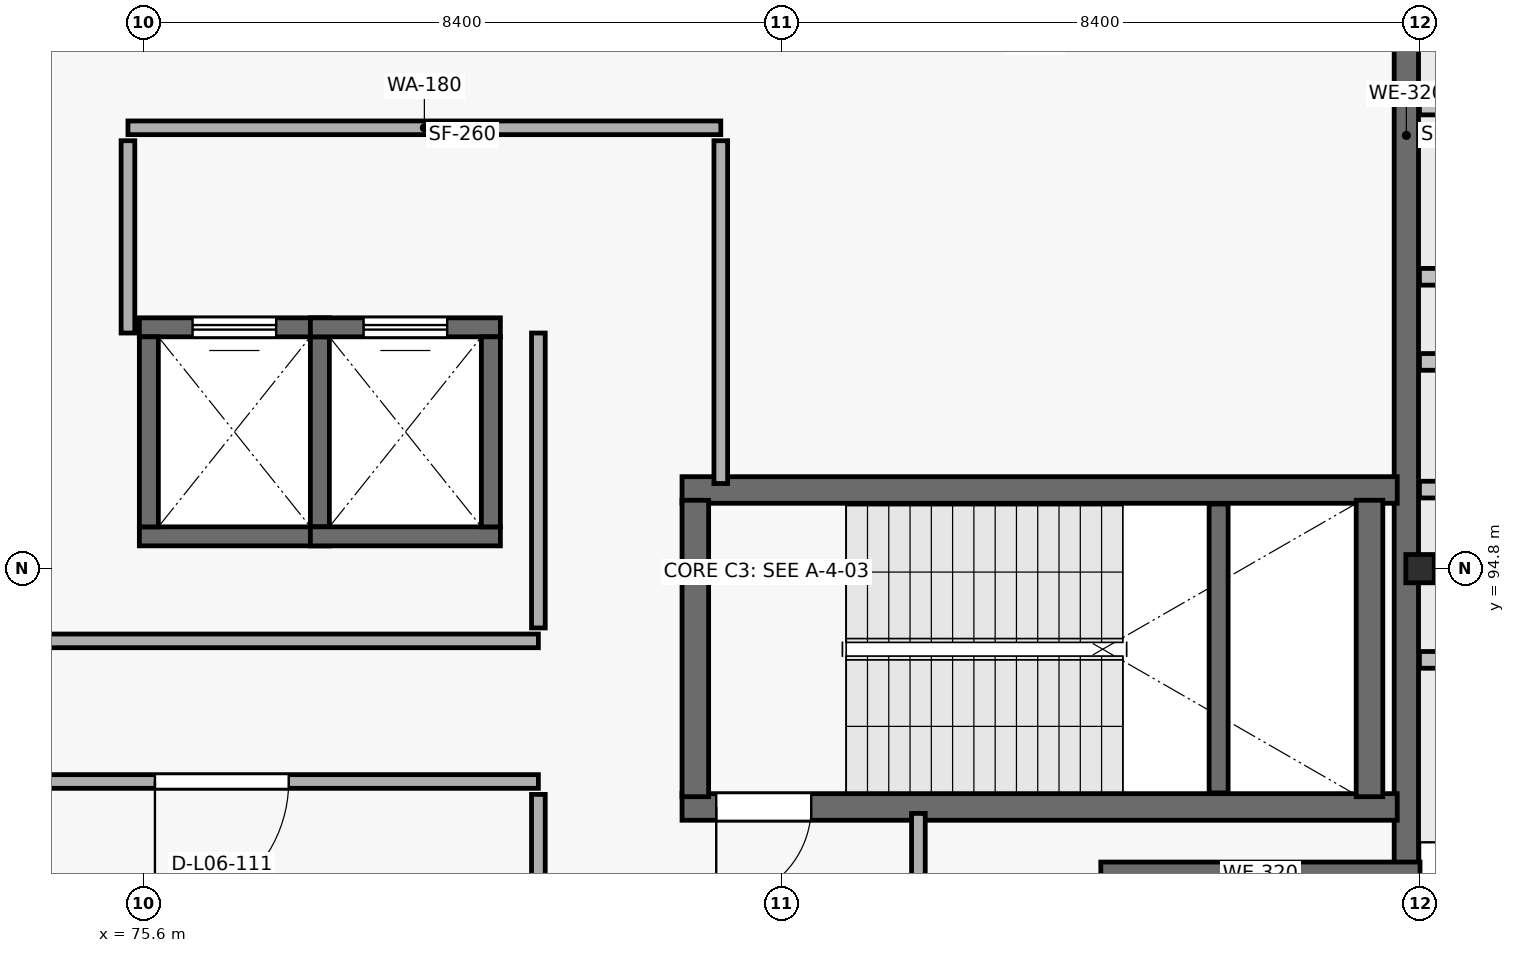
"""IFC4 building model, lengths in metres.
Left out: names, types, materials, properties, quantities, classifications, styles, units other than length and angle.
Written with IfcOpenShell. Run it as: python <this file> out.ifc"""

import sys

from ifc_helpers import new_model, si_unit, direction, frame, frame_2d, origin, origin_2d, place, context, subcontext, project, spatial, rectangle, i_section, extrude, element, fill, save


model = new_model("IFC4")
c1 = context("Model", 3, precision=1e-05, world=origin(), true_north=direction((0.0, 1.0)))
c2 = subcontext(c1, "Body", "Model", "MODEL_VIEW")
j1 = project(units=[si_unit("LENGTHUNIT", "METRE"), si_unit("PLANEANGLEUNIT", "RADIAN")], contexts=[c1])
p1 = place(None, origin())
s1 = spatial("IfcSite", under=j1, at=p1, CompositionType="ELEMENT")
p2 = place(p1, origin())
s2 = spatial("IfcBuilding", under=s1, at=p2, CompositionType="ELEMENT")
p3 = place(p2, frame((0.0, 0.0, 25.5)))
s3 = spatial("IfcBuildingStorey", under=s2, at=p3, CompositionType="ELEMENT", Elevation=25.5)
p4 = place(p3, frame((92.4, 94.8, 0.0), z_axis=(0.0, 0.0, 1.0), x_axis=(1.0, 0.0, 0.0)))
e1 = element("IfcColumn", 1, at=p4, inside=s3, PredefinedType="COLUMN", context=c2, shape_type="SweptSolid", body=[
    extrude(i_section(OverallWidth=0.374, OverallDepth=0.372, WebThickness=0.016, FlangeThickness=0.026, at=origin_2d()), origin(), (0.0, 0.0, 1.0), 5.1),
])
p5 = place(p3, frame((92.22, 110.4, 0.0), z_axis=(0.0, 0.0, 1.0), x_axis=(0.0, -1.0, 0.0)))
e2 = element("IfcWall", 2, at=p5, inside=s3, PredefinedType="SOLIDWALL", context=c2, shape_type="SweptSolid", body=[
    extrude(rectangle(XDim=19.8, YDim=0.32, at=frame_2d((9.9, 0.0))), origin(), (0.0, 0.0, 1.0), 4.86),
])
p6 = place(p5, frame((5.26, 0.0, 0.75)))
e3 = element("IfcOpeningElement", 3, at=p6, cuts=e2, PredefinedType="OPENING", context=c2, shape_type="SweptSolid", body=[
    extrude(rectangle(XDim=0.68, YDim=3.05, at=frame_2d((0.34, 1.525))), frame((0.0, 0.17, 0.0), z_axis=(0.0, -1.0, 0.0), x_axis=(1.0, 0.0, 0.0)), (0.0, 0.0, 1.0), 0.34),
])
p7 = place(p3, frame((92.4, 90.78, 0.0), z_axis=(0.0, 0.0, 1.0), x_axis=(-1.0, 0.0, 0.0)))
e4 = element("IfcWall", 4, at=p7, inside=s3, PredefinedType="SOLIDWALL", context=c2, shape_type="SweptSolid", body=[
    extrude(rectangle(XDim=4.2, YDim=0.32, at=frame_2d((2.1, 0.0))), origin(), (0.0, 0.0, 1.0), 4.82),
])
p8 = place(p3, frame((82.69, 91.665, 0.0), z_axis=(0.0, 0.0, 1.0), x_axis=(1.0, 0.0, 0.0)))
e5 = element("IfcWall", 5, at=p8, inside=s3, PredefinedType="SHEAR", context=c2, shape_type="SweptSolid", body=[
    extrude(rectangle(XDim=9.41, YDim=0.35, at=frame_2d((4.705, 0.0))), origin(), (0.0, 0.0, 1.0), 4.82),
])
p9 = place(p8, frame((0.45, 0.0, 0.0)))
e6 = element("IfcOpeningElement", 6, at=p9, cuts=e5, PredefinedType="OPENING", context=c2, shape_type="SweptSolid", body=[
    extrude(rectangle(XDim=1.25, YDim=2.2, at=frame_2d((0.625, 1.1))), frame((0.0, 0.185, 0.0), z_axis=(0.0, -1.0, 0.0), x_axis=(1.0, 0.0, 0.0)), (0.0, 0.0, 1.0), 0.37),
])
p10 = place(p3, frame((92.1, 95.835, 0.0), z_axis=(0.0, 0.0, 1.0), x_axis=(-1.0, 0.0, 0.0)))
e7 = element("IfcWall", 7, at=p10, inside=s3, PredefinedType="SHEAR", context=c2, shape_type="SweptSolid", body=[
    extrude(rectangle(XDim=9.41, YDim=0.35, at=frame_2d((4.705, 0.0))), origin(), (0.0, 0.0, 1.0), 4.82),
])
for number, where, z_axis, x_axis in (
    (8, (82.865, 91.8, 0.0), (0.0, 0.0, 1.0), (0.0, 1.0, 0.0)),
    (9, (91.735, 95.7, 0.0), (0.0, 0.0, 1.0), (0.0, -1.0, 0.0)),
):
    element("IfcWall", number, at=place(p3, frame(where, z_axis=z_axis, x_axis=x_axis)), inside=s3, PredefinedType="SHEAR", context=c2, shape_type="SweptSolid", body=[
        extrude(rectangle(XDim=3.9, YDim=0.35, at=frame_2d((1.95, 0.0))), origin(), (0.0, 0.0, 1.0), 4.82),
    ])
p11 = place(p3, frame((89.75, 91.85, 0.0), z_axis=(0.0, 0.0, 1.0), x_axis=(0.0, 1.0, 0.0)))
e10 = element("IfcWall", 10, at=p11, inside=s3, PredefinedType="SHEAR", context=c2, shape_type="SweptSolid", body=[
    extrude(rectangle(XDim=3.8, YDim=0.25, at=frame_2d((1.9, 0.0))), origin(), (0.0, 0.0, 1.0), 2.37),
])
p12 = place(p3, frame((75.55, 95.225, 0.0), z_axis=(0.0, 0.0, 1.0), x_axis=(1.0, 0.0, 0.0)))
e11 = element("IfcWall", 11, at=p12, inside=s3, PredefinedType="SHEAR", context=c2, shape_type="SweptSolid", body=[
    extrude(rectangle(XDim=2.5, YDim=0.25, at=frame_2d((1.25, 0.0))), origin(), (0.0, 0.0, 1.0), 4.82),
])
p13 = place(p3, frame((78.05, 97.975, 0.0), z_axis=(0.0, 0.0, 1.0), x_axis=(-1.0, 0.0, 0.0)))
e12 = element("IfcWall", 12, at=p13, inside=s3, PredefinedType="SHEAR", context=c2, shape_type="SweptSolid", body=[
    extrude(rectangle(XDim=2.5, YDim=0.25, at=frame_2d((1.25, 0.0))), origin(), (0.0, 0.0, 1.0), 4.82),
])
p14 = place(p13, frame((0.7, 0.0, 0.0)))
e13 = element("IfcOpeningElement", 13, at=p14, cuts=e12, PredefinedType="OPENING", context=c2, shape_type="SweptSolid", body=[
    extrude(rectangle(XDim=1.1, YDim=2.2, at=frame_2d((0.55, 1.1))), frame((0.0, 0.135, 0.0), z_axis=(0.0, -1.0, 0.0), x_axis=(1.0, 0.0, 0.0)), (0.0, 0.0, 1.0), 0.27),
])
for number, where, z_axis, x_axis in (
    (14, (75.675, 95.35, 0.0), (0.0, 0.0, 1.0), (0.0, 1.0, 0.0)),
    (15, (77.925, 97.85, 0.0), (0.0, 0.0, 1.0), (0.0, -1.0, 0.0)),
    (16, (77.8, 95.225, 0.0), (0.0, 0.0, 1.0), (1.0, 0.0, 0.0)),
):
    element("IfcWall", number, at=place(p3, frame(where, z_axis=z_axis, x_axis=x_axis)), inside=s3, PredefinedType="SHEAR", context=c2, shape_type="SweptSolid", body=[
        extrude(rectangle(XDim=2.5, YDim=0.25, at=frame_2d((1.25, 0.0))), origin(), (0.0, 0.0, 1.0), 4.82),
    ])
p15 = place(p3, frame((80.3, 97.975, 0.0), z_axis=(0.0, 0.0, 1.0), x_axis=(-1.0, 0.0, 0.0)))
e17 = element("IfcWall", 17, at=p15, inside=s3, PredefinedType="SHEAR", context=c2, shape_type="SweptSolid", body=[
    extrude(rectangle(XDim=2.5, YDim=0.25, at=frame_2d((1.25, 0.0))), origin(), (0.0, 0.0, 1.0), 4.82),
])
p16 = place(p15, frame((0.7, 0.0, 0.0)))
e18 = element("IfcOpeningElement", 18, at=p16, cuts=e17, PredefinedType="OPENING", context=c2, shape_type="SweptSolid", body=[
    extrude(rectangle(XDim=1.1, YDim=2.2, at=frame_2d((0.55, 1.1))), frame((0.0, 0.135, 0.0), z_axis=(0.0, -1.0, 0.0), x_axis=(1.0, 0.0, 0.0)), (0.0, 0.0, 1.0), 0.27),
])
p17 = place(p3, frame((80.175, 97.85, 0.0), z_axis=(0.0, 0.0, 1.0), x_axis=(0.0, -1.0, 0.0)))
e19 = element("IfcWall", 19, at=p17, inside=s3, PredefinedType="SHEAR", context=c2, shape_type="SweptSolid", body=[
    extrude(rectangle(XDim=2.5, YDim=0.25, at=frame_2d((1.25, 0.0))), origin(), (0.0, 0.0, 1.0), 4.82),
])
p18 = place(p3, frame((72.47, 92.0, 0.0), z_axis=(0.0, 0.0, 1.0), x_axis=(1.0, 0.0, 0.0)))
e20 = element("IfcWall", 20, at=p18, inside=s3, PredefinedType="PARTITIONING", context=c2, shape_type="SweptSolid", body=[
    extrude(rectangle(XDim=8.33, YDim=0.18, at=frame_2d((4.165, 0.0))), origin(), (0.0, 0.0, 1.0), 4.82),
])
p19 = place(p18, frame((3.285, 0.0, 0.0)))
e21 = element("IfcOpeningElement", 21, at=p19, cuts=e20, PredefinedType="OPENING", context=c2, shape_type="SweptSolid", body=[
    extrude(rectangle(XDim=1.76, YDim=2.48, at=frame_2d((0.88, 1.24))), frame((0.0, 0.1, 0.0), z_axis=(0.0, -1.0, 0.0), x_axis=(1.0, 0.0, 0.0)), (0.0, 0.0, 1.0), 0.2),
])
p20 = place(p3, frame((80.8, 93.85, 0.0), z_axis=(0.0, 0.0, 1.0), x_axis=(-1.0, 0.0, 0.0)))
e22 = element("IfcWall", 22, at=p20, inside=s3, PredefinedType="PARTITIONING", context=c2, shape_type="SweptSolid", body=[
    extrude(rectangle(XDim=8.33, YDim=0.18, at=frame_2d((4.165, 0.0))), origin(), (0.0, 0.0, 1.0), 4.82),
])
p21 = place(p3, frame((83.2, 100.6, 0.0), z_axis=(0.0, 0.0, 1.0), x_axis=(-1.0, 0.0, 0.0)))
e23 = element("IfcWall", 23, at=p21, inside=s3, PredefinedType="PARTITIONING", context=c2, shape_type="SweptSolid", body=[
    extrude(rectangle(XDim=7.8, YDim=0.18, at=frame_2d((3.9, 0.0))), origin(), (0.0, 0.0, 1.0), 4.82),
])
p22 = place(p3, frame((83.2, 95.92, 0.0), z_axis=(0.0, 0.0, 1.0), x_axis=(0.0, 1.0, 0.0)))
e24 = element("IfcWall", 24, at=p22, inside=s3, PredefinedType="PARTITIONING", context=c2, shape_type="SweptSolid", body=[
    extrude(rectangle(XDim=4.51, YDim=0.18, at=frame_2d((2.255, 0.0))), origin(), (0.0, 0.0, 1.0), 4.82),
])
p23 = place(p3, frame((80.8, 97.9, 0.0), z_axis=(0.0, 0.0, 1.0), x_axis=(0.0, -1.0, 0.0)))
e25 = element("IfcWall", 25, at=p23, inside=s3, PredefinedType="PARTITIONING", context=c2, shape_type="SweptSolid", body=[
    extrude(rectangle(XDim=3.88, YDim=0.18, at=frame_2d((1.94, 0.0))), origin(), (0.0, 0.0, 1.0), 4.82),
])
p24 = place(p3, frame((80.8, 91.83, 0.0), z_axis=(0.0, 0.0, 1.0), x_axis=(0.0, -1.0, 0.0)))
e26 = element("IfcWall", 26, at=p24, inside=s3, PredefinedType="PARTITIONING", context=c2, shape_type="SweptSolid", body=[
    extrude(rectangle(XDim=2.46, YDim=0.18, at=frame_2d((1.23, 0.0))), origin(), (0.0, 0.0, 1.0), 4.82),
])
p25 = place(p3, frame((75.4, 100.43, 0.0), z_axis=(0.0, 0.0, 1.0), x_axis=(0.0, -1.0, 0.0)))
e27 = element("IfcWall", 27, at=p25, inside=s3, PredefinedType="PARTITIONING", context=c2, shape_type="SweptSolid", body=[
    extrude(rectangle(XDim=2.53, YDim=0.18, at=frame_2d((1.265, 0.0))), origin(), (0.0, 0.0, 1.0), 3.45),
])
p26 = place(p3, frame((85.8, 89.37, 0.0), z_axis=(0.0, 0.0, 1.0), x_axis=(0.0, 1.0, 0.0)))
e28 = element("IfcWall", 28, at=p26, inside=s3, PredefinedType="PARTITIONING", context=c2, shape_type="SweptSolid", body=[
    extrude(rectangle(XDim=2.21, YDim=0.18, at=frame_2d((1.105, 0.0))), origin(), (0.0, 0.0, 1.0), 4.82),
])
p27 = place(p9, origin())
e29 = element("IfcDoor", 29, at=p27, inside=s3, OperationType="SINGLE_SWING_RIGHT", PredefinedType="DOOR", context=c2, shape_type="SweptSolid", body=[
    extrude(rectangle(XDim=1.25, YDim=2.2, at=frame_2d((0.625, 1.1))), frame((0.0, 0.025, 0.0), z_axis=(0.0, -1.0, 0.0), x_axis=(1.0, 0.0, 0.0)), (0.0, 0.0, 1.0), 0.05),
])
fill(e6, e29)
p28 = place(p14, origin())
e30 = element("IfcDoor", 30, at=p28, inside=s3, OperationType="SLIDING_TO_LEFT", PredefinedType="DOOR", context=c2, shape_type="SweptSolid", body=[
    extrude(rectangle(XDim=1.1, YDim=2.2, at=frame_2d((0.55, 1.1))), frame((0.0, 0.025, 0.0), z_axis=(0.0, -1.0, 0.0), x_axis=(1.0, 0.0, 0.0)), (0.0, 0.0, 1.0), 0.05),
])
fill(e13, e30)
p29 = place(p16, origin())
e31 = element("IfcDoor", 31, at=p29, inside=s3, OperationType="SLIDING_TO_LEFT", PredefinedType="DOOR", context=c2, shape_type="SweptSolid", body=[
    extrude(rectangle(XDim=1.1, YDim=2.2, at=frame_2d((0.55, 1.1))), frame((0.0, 0.025, 0.0), z_axis=(0.0, -1.0, 0.0), x_axis=(1.0, 0.0, 0.0)), (0.0, 0.0, 1.0), 0.05),
])
fill(e18, e31)
p30 = place(p19, origin())
e32 = element("IfcDoor", 32, at=p30, inside=s3, OperationType="SINGLE_SWING_RIGHT", PredefinedType="DOOR", context=c2, shape_type="SweptSolid", body=[
    extrude(rectangle(XDim=1.76, YDim=2.48, at=frame_2d((0.88, 1.24))), frame((0.0, 0.025, 0.0), z_axis=(0.0, -1.0, 0.0), x_axis=(1.0, 0.0, 0.0)), (0.0, 0.0, 1.0), 0.05),
])
fill(e21, e32)
save(model, sys.argv[1])
